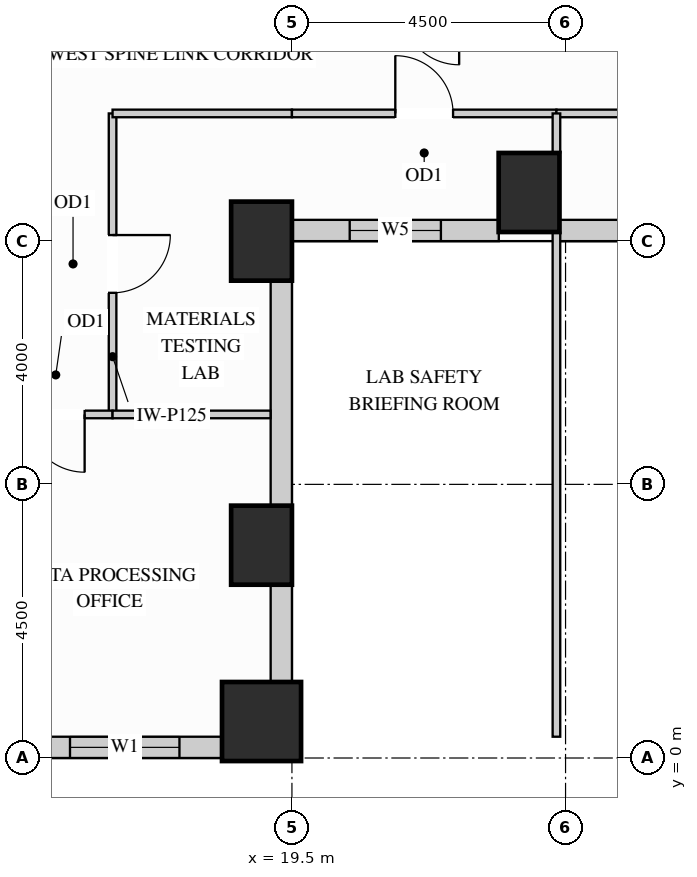
"""IFC4 building model, lengths in metres.
Left out: names, types, materials, properties, quantities, classifications, styles, units other than length and angle.
Written with IfcOpenShell. Run it as: python <this file> out.ifc"""

import sys

from ifc_helpers import new_model, si_unit, direction, frame, frame_2d, origin, origin_2d, place, context, subcontext, project, spatial, rectangle, extrude, source, transform, mapped, element, fill, save


model = new_model("IFC4")
c1 = context("Model", 3, precision=1e-05, world=origin(), true_north=direction((0.0, 1.0)))
c2 = subcontext(c1, "Body", "Model", "MODEL_VIEW")
j1 = project(units=[si_unit("LENGTHUNIT", "METRE"), si_unit("PLANEANGLEUNIT", "RADIAN")], contexts=[c1])
p1 = place(None, origin())
s1 = spatial("IfcSite", under=j1, at=p1, CompositionType="ELEMENT")
p2 = place(p1, origin())
s2 = spatial("IfcBuilding", under=s1, at=p2, CompositionType="ELEMENT")
p3 = place(p2, frame((0.0, 0.0, 36.9)))
s3 = spatial("IfcBuildingStorey", under=s2, at=p3, CompositionType="ELEMENT", Elevation=36.9)
m1 = source(origin(), c2, "Body", "SweptSolid", [
    extrude(rectangle(XDim=1.0, YDim=1.3, at=origin_2d()), origin(), (0.0, 0.0, 1.0), 3.38),
])
for number, where, z_axis, x_axis in (
    (1, (19.0, 3.5, 0.0), (0.0, 0.0, 1.0), (1.0, 0.0, 0.0)),
    (2, (19.0, 8.5, 0.0), (0.0, 0.0, 1.0), (1.0, 0.0, 0.0)),
    (3, (23.4, 9.3, 0.0), (0.0, 0.0, 1.0), (1.0, 0.0, 0.0)),
):
    element("IfcColumn", number, at=place(p3, frame(where, z_axis=z_axis, x_axis=x_axis)), inside=s3, PredefinedType="COLUMN", context=c2, shape_type="MappedRepresentation", body=[
        mapped(m1, transform((0.0, 0.0, 0.0), x_axis=(1.0, 0.0, 0.0), y_axis=(0.0, 1.0, 0.0), z_axis=(0.0, 0.0, 1.0))),
    ])
m2 = source(origin(), c2, "Body", "SweptSolid", [
    extrude(rectangle(XDim=1.3, YDim=1.3, at=origin_2d()), origin(), (0.0, 0.0, 1.0), 3.38),
])
p4 = place(p3, frame((19.0, 0.6, 0.0), z_axis=(0.0, 0.0, 1.0), x_axis=(1.0, 0.0, 0.0)))
e4 = element("IfcColumn", 4, at=p4, inside=s3, PredefinedType="COLUMN", context=c2, shape_type="MappedRepresentation", body=[
    mapped(m2, transform((0.0, 0.0, 0.0), x_axis=(1.0, 0.0, 0.0), y_axis=(0.0, 1.0, 0.0), z_axis=(0.0, 0.0, 1.0))),
])
p5 = place(p3, frame((15.148, 0.175, 0.0), z_axis=(0.0, 0.0, 1.0), x_axis=(1.0, 0.0, 0.0)))
e5 = element("IfcWall", 5, at=p5, inside=s3, PredefinedType="SOLIDWALL", context=c2, shape_type="SweptSolid", body=[
    extrude(rectangle(XDim=3.204, YDim=0.35, at=frame_2d((1.602, 0.0))), origin(), (0.0, 0.0, 1.0), 2.51),
])
p6 = place(p5, frame((0.702, 0.0, 0.78)))
e6 = element("IfcOpeningElement", 6, at=p6, cuts=e5, PredefinedType="OPENING", context=c2, shape_type="SweptSolid", body=[
    extrude(rectangle(XDim=1.8, YDim=1.55, at=frame_2d((0.9, 0.775))), frame((0.0, 0.185, 0.0), z_axis=(0.0, -1.0, 0.0), x_axis=(1.0, 0.0, 0.0)), (0.0, 0.0, 1.0), 0.37),
])
m3 = source(origin(), c2, "Body", "SweptSolid", [
    extrude(rectangle(XDim=1.604, YDim=0.35, at=frame_2d((0.802, 0.0))), origin(), (0.0, 0.0, 1.0), 2.51),
])
p7 = place(p3, frame((19.325, 1.248, 0.0), z_axis=(0.0, 0.0, 1.0), x_axis=(0.0, 1.0, 0.0)))
e7 = element("IfcWall", 7, at=p7, inside=s3, PredefinedType="SOLIDWALL", context=c2, shape_type="MappedRepresentation", body=[
    mapped(m3, transform((0.0, 0.0, 0.0), x_axis=(1.0, 0.0, 0.0), y_axis=(0.0, 1.0, 0.0), z_axis=(0.0, 0.0, 1.0))),
])
m4 = source(origin(), c2, "Body", "SweptSolid", [
    extrude(rectangle(XDim=3.704, YDim=0.35, at=frame_2d((1.852, 0.0))), origin(), (0.0, 0.0, 1.0), 2.51),
])
p8 = place(p3, frame((19.325, 4.148, 0.0), z_axis=(0.0, 0.0, 1.0), x_axis=(0.0, 1.0, 0.0)))
e8 = element("IfcWall", 8, at=p8, inside=s3, PredefinedType="SOLIDWALL", context=c2, shape_type="MappedRepresentation", body=[
    mapped(m4, transform((0.0, 0.0, 0.0), x_axis=(1.0, 0.0, 0.0), y_axis=(0.0, 1.0, 0.0), z_axis=(0.0, 0.0, 1.0))),
])
p9 = place(p3, frame((19.498, 8.675, 0.0), z_axis=(0.0, 0.0, 1.0), x_axis=(1.0, 0.0, 0.0)))
e9 = element("IfcWall", 9, at=p9, inside=s3, PredefinedType="SOLIDWALL", context=c2, shape_type="SweptSolid", body=[
    extrude(rectangle(XDim=3.404, YDim=0.35, at=frame_2d((1.702, 0.0))), origin(), (0.0, 0.0, 1.0), 3.365),
])
p10 = place(p9, frame((0.952, 0.0, 0.78)))
e10 = element("IfcOpeningElement", 10, at=p10, cuts=e9, PredefinedType="OPENING", context=c2, shape_type="SweptSolid", body=[
    extrude(rectangle(XDim=1.5, YDim=2.0, at=frame_2d((0.75, 1.0))), frame((0.0, 0.185, 0.0), z_axis=(0.0, -1.0, 0.0), x_axis=(1.0, 0.0, 0.0)), (0.0, 0.0, 1.0), 0.37),
])
p11 = place(p3, frame((23.898, 8.675, 0.0), z_axis=(0.0, 0.0, 1.0), x_axis=(1.0, 0.0, 0.0)))
e11 = element("IfcWall", 11, at=p11, inside=s3, PredefinedType="SOLIDWALL", context=c2, shape_type="SweptSolid", body=[
    extrude(rectangle(XDim=6.104, YDim=0.35, at=frame_2d((3.052, 0.0))), origin(), (0.0, 0.0, 1.0), 3.365),
])
p12 = place(p11, frame((1.114, 0.0, 0.78)))
e12 = element("IfcOpeningElement", 12, at=p12, cuts=e11, PredefinedType="OPENING", context=c2, shape_type="SweptSolid", body=[
    extrude(rectangle(XDim=1.5, YDim=2.0, at=frame_2d((0.75, 1.0))), frame((0.0, 0.185, 0.0), z_axis=(0.0, -1.0, 0.0), x_axis=(1.0, 0.0, 0.0)), (0.0, 0.0, 1.0), 0.37),
])
p13 = place(p11, frame((3.408, 0.0, 0.78)))
e13 = element("IfcOpeningElement", 13, at=p13, cuts=e11, PredefinedType="OPENING", context=c2, shape_type="SweptSolid", body=[
    extrude(rectangle(XDim=1.5, YDim=2.0, at=frame_2d((0.75, 1.0))), frame((0.0, 0.185, 0.0), z_axis=(0.0, -1.0, 0.0), x_axis=(1.0, 0.0, 0.0)), (0.0, 0.0, 1.0), 0.37),
])
p14 = place(p3, frame((16.55, 5.65, 0.0), z_axis=(0.0, 0.0, 1.0), x_axis=(0.0, 1.0, 0.0)))
e14 = element("IfcWall", 14, at=p14, inside=s3, PredefinedType="PARTITIONING", context=c2, shape_type="SweptSolid", body=[
    extrude(rectangle(XDim=4.95, YDim=0.125, at=frame_2d((2.475, 0.0))), origin(), (0.0, 0.0, 1.0), 3.365),
])
p15 = place(p14, frame((2.0, 0.0, 0.0)))
e15 = element("IfcOpeningElement", 15, at=p15, cuts=e14, PredefinedType="OPENING", context=c2, shape_type="SweptSolid", body=[
    extrude(rectangle(XDim=0.95, YDim=2.15, at=frame_2d((0.475, 1.075))), frame((0.0, 0.073, 0.0), z_axis=(0.0, -1.0, 0.0), x_axis=(1.0, 0.0, 0.0)), (0.0, 0.0, 1.0), 0.145),
])
m5 = source(origin(), c2, "Body", "SweptSolid", [
    extrude(rectangle(XDim=2.95, YDim=0.125, at=frame_2d((1.475, 0.0))), origin(), (0.0, 0.0, 1.0), 3.365),
])
p16 = place(p3, frame((16.55, 10.6, 0.0), z_axis=(0.0, 0.0, 1.0), x_axis=(1.0, 0.0, 0.0)))
e16 = element("IfcWall", 16, at=p16, inside=s3, PredefinedType="PARTITIONING", context=c2, shape_type="MappedRepresentation", body=[
    mapped(m5, transform((0.0, 0.0, 0.0), x_axis=(1.0, 0.0, 0.0), y_axis=(0.0, 1.0, 0.0), z_axis=(0.0, 0.0, 1.0))),
])
p17 = place(p3, frame((19.5, 10.6, 0.0), z_axis=(0.0, 0.0, 1.0), x_axis=(1.0, 0.0, 0.0)))
e17 = element("IfcWall", 17, at=p17, inside=s3, PredefinedType="PARTITIONING", context=c2, shape_type="SweptSolid", body=[
    extrude(rectangle(XDim=4.35, YDim=0.125, at=frame_2d((2.175, 0.0))), origin(), (0.0, 0.0, 1.0), 3.365),
])
p18 = place(p17, frame((1.7, 0.0, 0.0)))
e18 = element("IfcOpeningElement", 18, at=p18, cuts=e17, PredefinedType="OPENING", context=c2, shape_type="SweptSolid", body=[
    extrude(rectangle(XDim=0.95, YDim=2.15, at=frame_2d((0.475, 1.075))), frame((0.0, 0.073, 0.0), z_axis=(0.0, -1.0, 0.0), x_axis=(1.0, 0.0, 0.0)), (0.0, 0.0, 1.0), 0.145),
])
p19 = place(p3, frame((23.85, 10.6, 0.0), z_axis=(0.0, 0.0, 1.0), x_axis=(1.0, 0.0, 0.0)))
e19 = element("IfcWall", 19, at=p19, inside=s3, PredefinedType="PARTITIONING", context=c2, shape_type="SweptSolid", body=[
    extrude(rectangle(XDim=6.0, YDim=0.125, at=frame_2d((3.0, 0.0))), origin(), (0.0, 0.0, 1.0), 3.365),
])
p20 = place(p19, frame((2.525, 0.0, 0.0)))
e20 = element("IfcOpeningElement", 20, at=p20, cuts=e19, PredefinedType="OPENING", context=c2, shape_type="SweptSolid", body=[
    extrude(rectangle(XDim=0.95, YDim=2.15, at=frame_2d((0.475, 1.075))), frame((0.0, 0.073, 0.0), z_axis=(0.0, -1.0, 0.0), x_axis=(1.0, 0.0, 0.0)), (0.0, 0.0, 1.0), 0.145),
])
m6 = source(origin(), c2, "Body", "SweptSolid", [
    extrude(rectangle(XDim=8.29, YDim=0.125, at=frame_2d((4.145, 0.0))), origin(), (0.0, 0.0, 1.0), 3.365),
])
p21 = place(p3, frame((23.85, 0.35, 0.0), z_axis=(0.0, 0.0, 1.0), x_axis=(0.0, 1.0, 0.0)))
e21 = element("IfcWall", 21, at=p21, inside=s3, PredefinedType="PARTITIONING", context=c2, shape_type="MappedRepresentation", body=[
    mapped(m6, transform((0.0, 0.0, 0.0), x_axis=(1.0, 0.0, 0.0), y_axis=(0.0, 1.0, 0.0), z_axis=(0.0, 0.0, 1.0))),
])
m7 = source(origin(), c2, "Body", "SweptSolid", [
    extrude(rectangle(XDim=0.64, YDim=0.125, at=frame_2d((0.32, 0.0))), origin(), (0.0, 0.0, 1.0), 3.365),
])
p22 = place(p3, frame((23.85, 9.96, 0.0), z_axis=(0.0, 0.0, 1.0), x_axis=(0.0, 1.0, 0.0)))
e22 = element("IfcWall", 22, at=p22, inside=s3, PredefinedType="PARTITIONING", context=c2, shape_type="MappedRepresentation", body=[
    mapped(m7, transform((0.0, 0.0, 0.0), x_axis=(1.0, 0.0, 0.0), y_axis=(0.0, 1.0, 0.0), z_axis=(0.0, 0.0, 1.0))),
])
p23 = place(p3, frame((14.681, 5.65, 0.0), z_axis=(0.0, 0.0, 1.0), x_axis=(1.0, 0.0, 0.0)))
e23 = element("IfcWall", 23, at=p23, inside=s3, PredefinedType="PARTITIONING", context=c2, shape_type="SweptSolid", body=[
    extrude(rectangle(XDim=1.869, YDim=0.125, at=frame_2d((0.935, 0.0))), origin(), (0.0, 0.0, 1.0), 3.365),
])
p24 = place(p23, frame((0.459, 0.0, 0.0)))
e24 = element("IfcOpeningElement", 24, at=p24, cuts=e23, PredefinedType="OPENING", context=c2, shape_type="SweptSolid", body=[
    extrude(rectangle(XDim=0.95, YDim=2.15, at=frame_2d((0.475, 1.075))), frame((0.0, 0.073, 0.0), z_axis=(0.0, -1.0, 0.0), x_axis=(1.0, 0.0, 0.0)), (0.0, 0.0, 1.0), 0.145),
])
m8 = source(origin(), c2, "Body", "SweptSolid", [
    extrude(rectangle(XDim=2.598, YDim=0.125, at=frame_2d((1.299, 0.0))), origin(), (0.0, 0.0, 1.0), 3.365),
])
p25 = place(p3, frame((16.55, 5.65, 0.0), z_axis=(0.0, 0.0, 1.0), x_axis=(1.0, 0.0, 0.0)))
e25 = element("IfcWall", 25, at=p25, inside=s3, PredefinedType="PARTITIONING", context=c2, shape_type="MappedRepresentation", body=[
    mapped(m8, transform((0.0, 0.0, 0.0), x_axis=(1.0, 0.0, 0.0), y_axis=(0.0, 1.0, 0.0), z_axis=(0.0, 0.0, 1.0))),
])
m9 = source(origin(), c2, "Body", "SweptSolid", [
    extrude(rectangle(XDim=0.95, YDim=2.15, at=frame_2d((0.475, 1.075))), frame((0.0, 0.025, 0.0), z_axis=(0.0, -1.0, 0.0), x_axis=(1.0, 0.0, 0.0)), (0.0, 0.0, 1.0), 0.05),
])
p26 = place(p15, origin())
e26 = element("IfcDoor", 26, at=p26, inside=s3, OperationType="SINGLE_SWING_RIGHT", PredefinedType="DOOR", context=c2, shape_type="MappedRepresentation", body=[
    mapped(m9, transform((0.0, 0.0, 0.0), x_axis=(1.0, 0.0, 0.0), y_axis=(0.0, 1.0, 0.0), z_axis=(0.0, 0.0, 1.0))),
])
fill(e15, e26)
p27 = place(p24, origin())
e27 = element("IfcDoor", 27, at=p27, inside=s3, OperationType="SINGLE_SWING_RIGHT", PredefinedType="DOOR", context=c2, shape_type="MappedRepresentation", body=[
    mapped(m9, transform((0.0, 0.0, 0.0), x_axis=(1.0, 0.0, 0.0), y_axis=(0.0, 1.0, 0.0), z_axis=(0.0, 0.0, 1.0))),
])
fill(e24, e27)
p28 = place(p18, origin())
e28 = element("IfcDoor", 28, at=p28, inside=s3, OperationType="SINGLE_SWING_LEFT", PredefinedType="DOOR", context=c2, shape_type="MappedRepresentation", body=[
    mapped(m9, transform((0.0, 0.0, 0.0), x_axis=(1.0, 0.0, 0.0), y_axis=(0.0, 1.0, 0.0), z_axis=(0.0, 0.0, 1.0))),
])
fill(e18, e28)
m10 = source(origin(), c2, "Body", "SweptSolid", [
    extrude(rectangle(XDim=1.8, YDim=1.55, at=frame_2d((0.9, 0.775))), frame((0.0, 0.03, 0.0), z_axis=(0.0, -1.0, 0.0), x_axis=(1.0, 0.0, 0.0)), (0.0, 0.0, 1.0), 0.06),
])
p29 = place(p6, origin())
e29 = element("IfcWindow", 29, at=p29, inside=s3, PartitioningType="SINGLE_PANEL", PredefinedType="WINDOW", context=c2, shape_type="MappedRepresentation", body=[
    mapped(m10, transform((0.0, 0.0, 0.0), x_axis=(1.0, 0.0, 0.0), y_axis=(0.0, 1.0, 0.0), z_axis=(0.0, 0.0, 1.0))),
])
fill(e6, e29)
m11 = source(origin(), c2, "Body", "SweptSolid", [
    extrude(rectangle(XDim=1.5, YDim=2.0, at=frame_2d((0.75, 1.0))), frame((0.0, 0.03, 0.0), z_axis=(0.0, -1.0, 0.0), x_axis=(1.0, 0.0, 0.0)), (0.0, 0.0, 1.0), 0.06),
])
p30 = place(p10, origin())
e30 = element("IfcWindow", 30, at=p30, inside=s3, PartitioningType="SINGLE_PANEL", PredefinedType="WINDOW", context=c2, shape_type="MappedRepresentation", body=[
    mapped(m11, transform((0.0, 0.0, 0.0), x_axis=(1.0, 0.0, 0.0), y_axis=(0.0, 1.0, 0.0), z_axis=(0.0, 0.0, 1.0))),
])
fill(e10, e30)
save(model, sys.argv[1])
